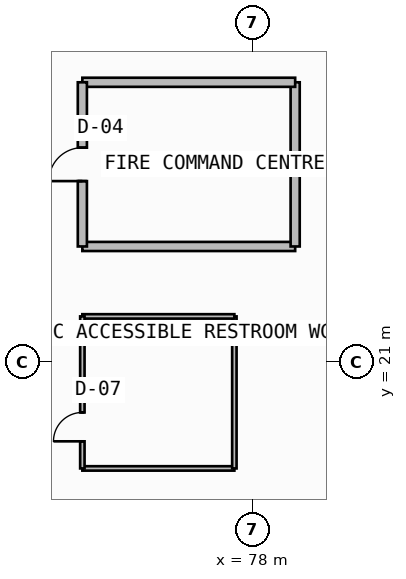
"""IFC4 building model, lengths in metres.
Left out: names, types, materials, properties, quantities, classifications, styles, units other than length and angle.
Written with IfcOpenShell. Run it as: python <this file> out.ifc"""

import sys

from ifc_helpers import new_model, si_unit, direction, frame, frame_2d, origin, place, context, subcontext, project, spatial, rectangle, extrude, element, fill, save


model = new_model("IFC4")
c1 = context("Model", 3, precision=1e-05, world=origin(), true_north=direction((0.0, 1.0)))
c2 = subcontext(c1, "Body", "Model", "MODEL_VIEW")
j1 = project(units=[si_unit("LENGTHUNIT", "METRE"), si_unit("PLANEANGLEUNIT", "RADIAN")], contexts=[c1])
p1 = place(None, origin())
s1 = spatial("IfcSite", under=j1, at=p1, CompositionType="ELEMENT")
p2 = place(p1, origin())
s2 = spatial("IfcBuilding", under=s1, at=p2, CompositionType="ELEMENT")
p3 = place(p2, origin())
s3 = spatial("IfcBuildingStorey", under=s2, at=p3, CompositionType="ELEMENT", Elevation=0.0)
p4 = place(p3, frame((72.4, 24.8, 0.0), z_axis=(0.0, 0.0, 1.0), x_axis=(1.0, 0.0, 0.0)))
e1 = element("IfcWall", 1, at=p4, inside=s3, PredefinedType="SOLIDWALL", context=c2, shape_type="SweptSolid", body=[
    extrude(rectangle(XDim=7.0, YDim=0.3, at=frame_2d((3.5, 0.0))), origin(), (0.0, 0.0, 1.0), 4.18),
])
p5 = place(p3, frame((79.4, 24.8, 0.0), z_axis=(0.0, 0.0, 1.0), x_axis=(0.0, 1.0, 0.0)))
e2 = element("IfcWall", 2, at=p5, inside=s3, PredefinedType="SOLIDWALL", context=c2, shape_type="SweptSolid", body=[
    extrude(rectangle(XDim=5.4, YDim=0.3, at=frame_2d((2.7, 0.0))), origin(), (0.0, 0.0, 1.0), 4.18),
])
p6 = place(p3, frame((79.4, 30.2, 0.0), z_axis=(0.0, 0.0, 1.0), x_axis=(-1.0, 0.0, 0.0)))
e3 = element("IfcWall", 3, at=p6, inside=s3, PredefinedType="SOLIDWALL", context=c2, shape_type="SweptSolid", body=[
    extrude(rectangle(XDim=7.0, YDim=0.3, at=frame_2d((3.5, 0.0))), origin(), (0.0, 0.0, 1.0), 4.18),
])
p7 = place(p3, frame((72.4, 30.2, 0.0), z_axis=(0.0, 0.0, 1.0), x_axis=(0.0, -1.0, 0.0)))
e4 = element("IfcWall", 4, at=p7, inside=s3, PredefinedType="SOLIDWALL", context=c2, shape_type="SweptSolid", body=[
    extrude(rectangle(XDim=5.4, YDim=0.3, at=frame_2d((2.7, 0.0))), origin(), (0.0, 0.0, 1.0), 4.18),
])
p8 = place(p7, frame((2.15, 0.0, 0.0)))
e5 = element("IfcOpeningElement", 5, at=p8, cuts=e4, PredefinedType="OPENING", context=c2, shape_type="SweptSolid", body=[
    extrude(rectangle(XDim=1.1, YDim=2.2, at=frame_2d((0.55, 1.1))), frame((0.0, 0.16, 0.0), z_axis=(0.0, -1.0, 0.0), x_axis=(1.0, 0.0, 0.0)), (0.0, 0.0, 1.0), 0.32),
])
p9 = place(p3, frame((72.4, 17.5, 0.0), z_axis=(0.0, 0.0, 1.0), x_axis=(1.0, 0.0, 0.0)))
e6 = element("IfcWall", 6, at=p9, inside=s3, PredefinedType="PARTITIONING", context=c2, shape_type="SweptSolid", body=[
    extrude(rectangle(XDim=5.0, YDim=0.145, at=frame_2d((2.5, 0.0))), origin(), (0.0, 0.0, 1.0), 3.665),
])
p10 = place(p3, frame((77.4, 17.5, 0.0), z_axis=(0.0, 0.0, 1.0), x_axis=(0.0, 1.0, 0.0)))
e7 = element("IfcWall", 7, at=p10, inside=s3, PredefinedType="PARTITIONING", context=c2, shape_type="SweptSolid", body=[
    extrude(rectangle(XDim=5.0, YDim=0.145, at=frame_2d((2.5, 0.0))), origin(), (0.0, 0.0, 1.0), 3.465),
])
p11 = place(p3, frame((77.4, 22.5, 0.0), z_axis=(0.0, 0.0, 1.0), x_axis=(-1.0, 0.0, 0.0)))
e8 = element("IfcWall", 8, at=p11, inside=s3, PredefinedType="PARTITIONING", context=c2, shape_type="SweptSolid", body=[
    extrude(rectangle(XDim=5.0, YDim=0.145, at=frame_2d((2.5, 0.0))), origin(), (0.0, 0.0, 1.0), 4.18),
])
p12 = place(p3, frame((72.4, 22.5, 0.0), z_axis=(0.0, 0.0, 1.0), x_axis=(0.0, -1.0, 0.0)))
e9 = element("IfcWall", 9, at=p12, inside=s3, PredefinedType="PARTITIONING", context=c2, shape_type="SweptSolid", body=[
    extrude(rectangle(XDim=5.0, YDim=0.145, at=frame_2d((2.5, 0.0))), origin(), (0.0, 0.0, 1.0), 3.465),
])
p13 = place(p12, frame((3.159, 0.0, 0.0)))
e10 = element("IfcOpeningElement", 10, at=p13, cuts=e9, PredefinedType="OPENING", context=c2, shape_type="SweptSolid", body=[
    extrude(rectangle(XDim=0.95, YDim=2.15, at=frame_2d((0.475, 1.075))), frame((0.0, 0.083, 0.0), z_axis=(0.0, -1.0, 0.0), x_axis=(1.0, 0.0, 0.0)), (0.0, 0.0, 1.0), 0.165),
])
p14 = place(p8, frame((1.1, 0.0, 0.0), z_axis=(0.0, 0.0, 1.0), x_axis=(-1.0, 0.0, 0.0)))
e11 = element("IfcDoor", 11, at=p14, inside=s3, OperationType="SINGLE_SWING_LEFT", PredefinedType="DOOR", context=c2, shape_type="SweptSolid", body=[
    extrude(rectangle(XDim=1.1, YDim=2.2, at=frame_2d((0.55, 1.1))), frame((0.0, 0.025, 0.0), z_axis=(0.0, -1.0, 0.0), x_axis=(1.0, 0.0, 0.0)), (0.0, 0.0, 1.0), 0.05),
])
fill(e5, e11)
p15 = place(p13, frame((0.95, 0.0, 0.0), z_axis=(0.0, 0.0, 1.0), x_axis=(-1.0, 0.0, 0.0)))
e12 = element("IfcDoor", 12, at=p15, inside=s3, OperationType="SINGLE_SWING_LEFT", PredefinedType="DOOR", context=c2, shape_type="SweptSolid", body=[
    extrude(rectangle(XDim=0.95, YDim=2.15, at=frame_2d((0.475, 1.075))), frame((0.0, 0.025, 0.0), z_axis=(0.0, -1.0, 0.0), x_axis=(1.0, 0.0, 0.0)), (0.0, 0.0, 1.0), 0.05),
])
fill(e10, e12)
save(model, sys.argv[1])
